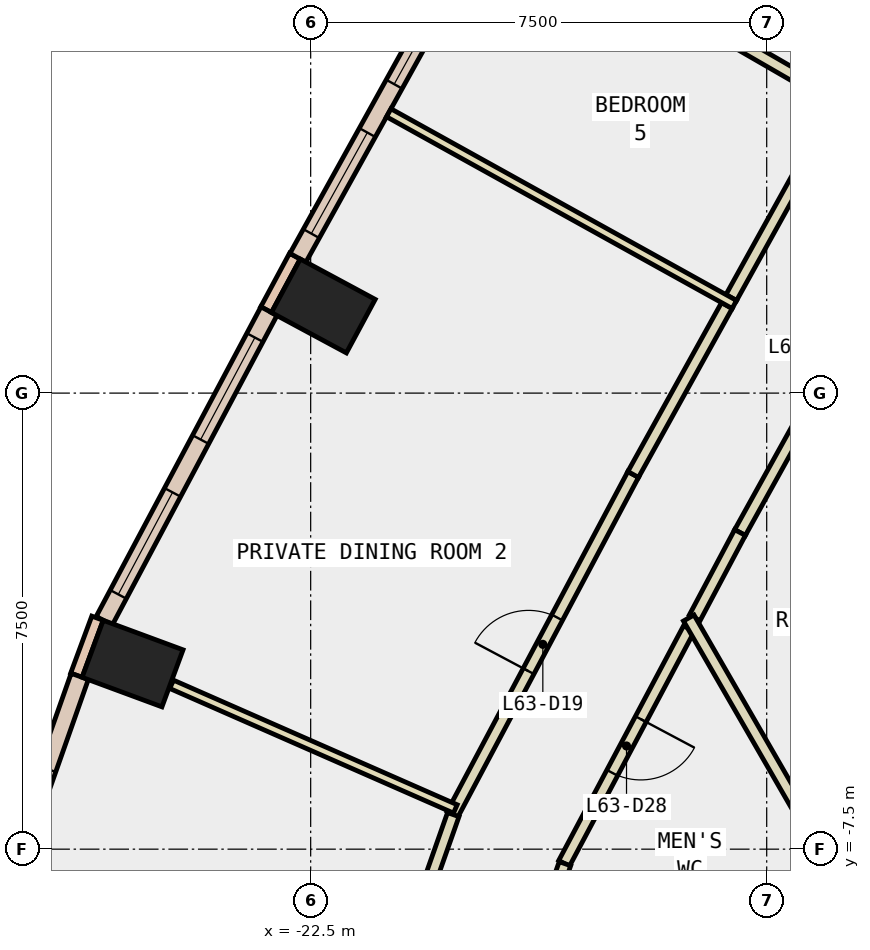
"""IFC4 building model, lengths in metres.
Left out: names, types, materials, properties, quantities, classifications, styles, units other than length and angle.
Written with IfcOpenShell. Run it as: python <this file> out.ifc"""

import sys

from ifc_helpers import new_model, si_unit, direction, frame, frame_2d, origin, origin_2d, place, context, subcontext, project, spatial, rectangle, extrude, element, fill, save


model = new_model("IFC4")
c1 = context("Model", 3, precision=1e-05, world=origin(), true_north=direction((0.0, 1.0)))
c2 = subcontext(c1, "Body", "Model", "MODEL_VIEW")
j1 = project(units=[si_unit("LENGTHUNIT", "METRE"), si_unit("PLANEANGLEUNIT", "RADIAN")], contexts=[c1])
p1 = place(None, origin())
s1 = spatial("IfcSite", under=j1, at=p1, CompositionType="ELEMENT")
p2 = place(p1, origin())
s2 = spatial("IfcBuilding", under=s1, at=p2, CompositionType="ELEMENT")
p3 = place(p2, frame((0.0, 0.0, 273.8)))
s3 = spatial("IfcBuildingStorey", under=s2, at=p3, CompositionType="ELEMENT", Elevation=273.8)
for number, where, z_axis, x_axis in (
    (1, (-22.292, 1.433, -0.34), (0.0, 0.0, 1.0), (0.474, 0.881, 0.0)),
    (2, (-25.429, -4.448, -0.34), (0.0, 0.0, 1.0), (0.347, 0.938, 0.0)),
):
    element("IfcColumn", number, at=place(p3, frame(where, z_axis=z_axis, x_axis=x_axis)), inside=s3, PredefinedType="COLUMN", context=c2, shape_type="SweptSolid", body=[
        extrude(rectangle(XDim=1.0, YDim=1.4, at=origin_2d()), origin(), (0.0, 0.0, 1.0), 3.6),
    ])
p4 = place(p3, frame((-7.578, -4.375, -0.34), z_axis=(0.0, 0.0, 1.0), x_axis=(-0.866024315419, -0.5000018851, 0.0)))
e3 = element("IfcWall", 3, at=p4, inside=s3, PredefinedType="SHEAR", context=c2, shape_type="SweptSolid", body=[
    extrude(rectangle(XDim=9.0, YDim=0.8, at=frame_2d((4.5, 0.0))), origin(), (0.0, 0.0, 1.0), 3.6),
])
p5 = place(p3, frame((-22.759, 2.253, 0.0), z_axis=(0.0, 0.0, 1.0), x_axis=(-0.473765014438, -0.880651299377, 0.0)))
e4 = element("IfcWall", 4, at=p5, inside=s3, PredefinedType="STANDARD", context=c2, shape_type="SweptSolid", body=[
    extrude(rectangle(XDim=1.0, YDim=0.2, at=frame_2d((0.5, 0.0))), origin(), (0.0, 0.0, 1.0), 3.26),
])
p6 = place(p3, frame((-26.006, -3.702, 0.0), z_axis=(0.0, 0.0, 1.0), x_axis=(-0.346892928577, -0.937904737222, 0.0)))
e5 = element("IfcWall", 5, at=p6, inside=s3, PredefinedType="STANDARD", context=c2, shape_type="SweptSolid", body=[
    extrude(rectangle(XDim=1.0, YDim=0.2, at=frame_2d((0.5, 0.0))), origin(), (0.0, 0.0, 1.0), 3.26),
])
p7 = place(p3, frame((-19.984, 7.14, 0.0), z_axis=(0.0, 0.0, 1.0), x_axis=(-0.485049005017, -0.874486971162, 0.0)))
e6 = element("IfcWall", 6, at=p7, inside=s3, PredefinedType="STANDARD", context=c2, shape_type="SweptSolid", body=[
    extrude(rectangle(XDim=5.62, YDim=0.3, at=frame_2d((2.81, 0.0))), origin(), (0.0, 0.0, 1.0), 3.26),
])
p8 = place(p7, frame((0.455, 0.0, 0.9)))
e7 = element("IfcOpeningElement", 7, at=p8, cuts=e6, PredefinedType="OPENING", context=c2, shape_type="SweptSolid", body=[
    extrude(rectangle(XDim=1.9, YDim=2.0, at=frame_2d((0.95, 1.0))), frame((0.0, 0.16, 0.0), z_axis=(0.0, -1.0, 0.0), x_axis=(1.0, 0.0, 0.0)), (0.0, 0.0, 1.0), 0.32),
])
p9 = place(p7, frame((3.265, 0.0, 0.9)))
e8 = element("IfcOpeningElement", 8, at=p9, cuts=e6, PredefinedType="OPENING", context=c2, shape_type="SweptSolid", body=[
    extrude(rectangle(XDim=1.9, YDim=2.0, at=frame_2d((0.95, 1.0))), frame((0.0, 0.16, 0.0), z_axis=(0.0, -1.0, 0.0), x_axis=(1.0, 0.0, 0.0)), (0.0, 0.0, 1.0), 0.32),
])
p10 = place(p3, frame((-23.186, 1.348, 0.0), z_axis=(0.0, 0.0, 1.0), x_axis=(-0.469691596427, -0.882830563724, 0.0)))
e9 = element("IfcWall", 9, at=p10, inside=s3, PredefinedType="STANDARD", context=c2, shape_type="SweptSolid", body=[
    extrude(rectangle(XDim=5.768, YDim=0.3, at=frame_2d((2.884, 0.0))), origin(), (0.0, 0.0, 1.0), 3.26),
])
p11 = place(p10, frame((0.492, 0.0, 0.9)))
e10 = element("IfcOpeningElement", 10, at=p11, cuts=e9, PredefinedType="OPENING", context=c2, shape_type="SweptSolid", body=[
    extrude(rectangle(XDim=1.9, YDim=2.0, at=frame_2d((0.95, 1.0))), frame((0.0, 0.16, 0.0), z_axis=(0.0, -1.0, 0.0), x_axis=(1.0, 0.0, 0.0)), (0.0, 0.0, 1.0), 0.32),
])
p12 = place(p10, frame((3.376, 0.0, 0.9)))
e11 = element("IfcOpeningElement", 11, at=p12, cuts=e9, PredefinedType="OPENING", context=c2, shape_type="SweptSolid", body=[
    extrude(rectangle(XDim=1.9, YDim=2.0, at=frame_2d((0.95, 1.0))), frame((0.0, 0.16, 0.0), z_axis=(0.0, -1.0, 0.0), x_axis=(1.0, 0.0, 0.0)), (0.0, 0.0, 1.0), 0.32),
])
p13 = place(p3, frame((-26.298, -4.659, 0.0), z_axis=(0.0, 0.0, 1.0), x_axis=(-0.332491532378, -0.943106240514, 0.0)))
e12 = element("IfcWall", 12, at=p13, inside=s3, PredefinedType="STANDARD", context=c2, shape_type="SweptSolid", body=[
    extrude(rectangle(XDim=4.625, YDim=0.3, at=frame_2d((2.312, 0.0))), origin(), (0.0, 0.0, 1.0), 3.26),
])
p14 = place(p13, frame((1.613, 0.0, 0.9)))
e13 = element("IfcOpeningElement", 13, at=p14, cuts=e12, PredefinedType="OPENING", context=c2, shape_type="SweptSolid", body=[
    extrude(rectangle(XDim=1.4, YDim=2.0, at=frame_2d((0.7, 1.0))), frame((0.0, 0.16, 0.0), z_axis=(0.0, -1.0, 0.0), x_axis=(1.0, 0.0, 0.0)), (0.0, 0.0, 1.0), 0.32),
])
p15 = place(p3, frame((-13.174, 1.79, 0.0), z_axis=(0.0, 0.0, 1.0), x_axis=(-0.485079003918, -0.874470331091, 0.0)))
e14 = element("IfcWall", 14, at=p15, inside=s3, PredefinedType="PARTITIONING", context=c2, shape_type="SweptSolid", body=[
    extrude(rectangle(XDim=4.669, YDim=0.2, at=frame_2d((2.334, 0.0))), origin(), (0.0, 0.0, 1.0), 3.26),
])
p16 = place(p15, frame((1.834, 0.0, 0.0)))
e15 = element("IfcOpeningElement", 15, at=p16, cuts=e14, PredefinedType="OPENING", context=c2, shape_type="SweptSolid", body=[
    extrude(rectangle(XDim=1.0, YDim=2.1, at=frame_2d((0.5, 1.05))), frame((0.0, 0.11, 0.0), z_axis=(0.0, -1.0, 0.0), x_axis=(1.0, 0.0, 0.0)), (0.0, 0.0, 1.0), 0.22),
])
p17 = place(p3, frame((-15.439, -2.293, 0.0), z_axis=(0.0, 0.0, 1.0), x_axis=(-0.469248780065, -0.883066012486, 0.0)))
e16 = element("IfcWall", 16, at=p17, inside=s3, PredefinedType="PARTITIONING", context=c2, shape_type="SweptSolid", body=[
    extrude(rectangle(XDim=1.59, YDim=0.2, at=frame_2d((0.795, 0.0))), origin(), (0.0, 0.0, 1.0), 3.26),
])
p18 = place(p3, frame((-16.279, -3.873, 0.0), z_axis=(0.0, 0.0, 1.0), x_axis=(-0.469587967357, -0.882885689608, 0.0)))
e17 = element("IfcWall", 17, at=p18, inside=s3, PredefinedType="PARTITIONING", context=c2, shape_type="SweptSolid", body=[
    extrude(rectangle(XDim=4.372, YDim=0.2, at=frame_2d((2.186, 0.0))), origin(), (0.0, 0.0, 1.0), 3.26),
])
p19 = place(p18, frame((1.686, 0.0, 0.0)))
e18 = element("IfcOpeningElement", 18, at=p19, cuts=e17, PredefinedType="OPENING", context=c2, shape_type="SweptSolid", body=[
    extrude(rectangle(XDim=1.0, YDim=2.1, at=frame_2d((0.5, 1.05))), frame((0.0, 0.11, 0.0), z_axis=(0.0, -1.0, 0.0), x_axis=(1.0, 0.0, 0.0)), (0.0, 0.0, 1.0), 0.22),
])
p20 = place(p3, frame((-18.318, -7.739, 0.0), z_axis=(0.0, 0.0, 1.0), x_axis=(-0.332486504777, -0.943108012977, 0.0)))
e19 = element("IfcWall", 19, at=p20, inside=s3, PredefinedType="PARTITIONING", context=c2, shape_type="SweptSolid", body=[
    extrude(rectangle(XDim=2.565, YDim=0.2, at=frame_2d((1.282, 0.0))), origin(), (0.0, 0.0, 1.0), 3.26),
])
p21 = place(p3, frame((-15.583, 1.571, 0.0), z_axis=(0.0, 0.0, 1.0), x_axis=(0.484944791944, 0.874544766588, 0.0)))
e20 = element("IfcWall", 20, at=p21, inside=s3, PredefinedType="PARTITIONING", context=c2, shape_type="SweptSolid", body=[
    extrude(rectangle(XDim=3.178, YDim=0.2, at=frame_2d((1.589, 0.0))), origin(), (0.0, 0.0, 1.0), 3.26),
])
p22 = place(p3, frame((-20.168, -6.926, 0.0), z_axis=(0.0, 0.0, 1.0), x_axis=(0.469552838911, 0.882904372778, 0.0)))
e21 = element("IfcWall", 21, at=p22, inside=s3, PredefinedType="PARTITIONING", context=c2, shape_type="SweptSolid", body=[
    extrude(rectangle(XDim=6.329, YDim=0.2, at=frame_2d((3.165, 0.0))), origin(), (0.0, 0.0, 1.0), 3.26),
])
p23 = place(p22, frame((2.665, 0.0, 0.0)))
e22 = element("IfcOpeningElement", 22, at=p23, cuts=e21, PredefinedType="OPENING", context=c2, shape_type="SweptSolid", body=[
    extrude(rectangle(XDim=1.0, YDim=2.1, at=frame_2d((0.5, 1.05))), frame((0.0, 0.11, 0.0), z_axis=(0.0, -1.0, 0.0), x_axis=(1.0, 0.0, 0.0)), (0.0, 0.0, 1.0), 0.22),
])
p24 = place(p3, frame((-17.196, -1.338, 0.0), z_axis=(0.0, 0.0, 1.0), x_axis=(0.485107756493, 0.87445438108, 0.0)))
e23 = element("IfcWall", 23, at=p24, inside=s3, PredefinedType="PARTITIONING", context=c2, shape_type="SweptSolid", body=[
    extrude(rectangle(XDim=3.177, YDim=0.2, at=frame_2d((1.588, 0.0))), origin(), (0.0, 0.0, 1.0), 3.26),
])
p25 = place(p3, frame((-21.248, -10.035, 0.0), z_axis=(0.0, 0.0, 1.0), x_axis=(0.332233916116, 0.943197023417, 0.0)))
e24 = element("IfcWall", 24, at=p25, inside=s3, PredefinedType="PARTITIONING", context=c2, shape_type="SweptSolid", body=[
    extrude(rectangle(XDim=3.29, YDim=0.2, at=frame_2d((1.645, 0.0))), origin(), (0.0, 0.0, 1.0), 3.26),
])
p26 = place(p3, frame((-14.079, -7.514, 0.0), z_axis=(0.0, 0.0, 1.0), x_axis=(-0.499959077901, 0.86604902888, 0.0)))
e25 = element("IfcWall", 25, at=p26, inside=s3, PredefinedType="PARTITIONING", context=c2, shape_type="SweptSolid", body=[
    extrude(rectangle(XDim=4.406, YDim=0.2, at=frame_2d((2.203, 0.0))), origin(), (0.0, 0.0, 1.0), 3.26),
])
p27 = place(p3, frame((-15.953, 6.039, 0.0), z_axis=(0.0, 0.0, 1.0), x_axis=(0.865998541277, -0.500046524342, 0.0)))
e26 = element("IfcWall", 26, at=p27, inside=s3, PredefinedType="PARTITIONING", context=c2, shape_type="SweptSolid", body=[
    extrude(rectangle(XDim=2.5, YDim=0.2, at=frame_2d((1.25, 0.0))), origin(), (0.0, 0.0, 1.0), 3.26),
])
p28 = place(p3, frame((-15.532, 1.457, 0.0), z_axis=(0.0, 0.0, 1.0), x_axis=(-0.874467143452, 0.485084750351, 0.0)))
e27 = element("IfcWall", 27, at=p28, inside=s3, PredefinedType="PARTITIONING", context=c2, shape_type="SweptSolid", body=[
    extrude(rectangle(XDim=6.5, YDim=0.15, at=frame_2d((3.25, 0.0))), origin(), (0.0, 0.0, 1.0), 3.26),
])
p29 = place(p3, frame((-20.121, -6.838, 0.0), z_axis=(0.0, 0.0, 1.0), x_axis=(-0.91561994307, 0.402044922679, 0.0)))
e28 = element("IfcWall", 28, at=p29, inside=s3, PredefinedType="PARTITIONING", context=c2, shape_type="SweptSolid", body=[
    extrude(rectangle(XDim=5.096, YDim=0.15, at=frame_2d((2.548, 0.0))), origin(), (0.0, 0.0, 1.0), 3.26),
])
p30 = place(p8, origin())
e29 = element("IfcWindow", 29, at=p30, inside=s3, PartitioningType="SINGLE_PANEL", PredefinedType="WINDOW", context=c2, shape_type="SweptSolid", body=[
    extrude(rectangle(XDim=1.9, YDim=2.0, at=frame_2d((0.95, 1.0))), frame((0.0, 0.03, 0.0), z_axis=(0.0, -1.0, 0.0), x_axis=(1.0, 0.0, 0.0)), (0.0, 0.0, 1.0), 0.06),
])
fill(e7, e29)
p31 = place(p9, origin())
e30 = element("IfcWindow", 30, at=p31, inside=s3, PartitioningType="SINGLE_PANEL", PredefinedType="WINDOW", context=c2, shape_type="SweptSolid", body=[
    extrude(rectangle(XDim=1.9, YDim=2.0, at=frame_2d((0.95, 1.0))), frame((0.0, 0.03, 0.0), z_axis=(0.0, -1.0, 0.0), x_axis=(1.0, 0.0, 0.0)), (0.0, 0.0, 1.0), 0.06),
])
fill(e8, e30)
p32 = place(p11, origin())
e31 = element("IfcWindow", 31, at=p32, inside=s3, PartitioningType="SINGLE_PANEL", PredefinedType="WINDOW", context=c2, shape_type="SweptSolid", body=[
    extrude(rectangle(XDim=1.9, YDim=2.0, at=frame_2d((0.95, 1.0))), frame((0.0, 0.03, 0.0), z_axis=(0.0, -1.0, 0.0), x_axis=(1.0, 0.0, 0.0)), (0.0, 0.0, 1.0), 0.06),
])
fill(e10, e31)
p33 = place(p12, origin())
e32 = element("IfcWindow", 32, at=p33, inside=s3, PartitioningType="SINGLE_PANEL", PredefinedType="WINDOW", context=c2, shape_type="SweptSolid", body=[
    extrude(rectangle(XDim=1.9, YDim=2.0, at=frame_2d((0.95, 1.0))), frame((0.0, 0.03, 0.0), z_axis=(0.0, -1.0, 0.0), x_axis=(1.0, 0.0, 0.0)), (0.0, 0.0, 1.0), 0.06),
])
fill(e11, e32)
p34 = place(p23, origin())
e33 = element("IfcDoor", 33, at=p34, inside=s3, OperationType="SINGLE_SWING_LEFT", PredefinedType="DOOR", context=c2, shape_type="SweptSolid", body=[
    extrude(rectangle(XDim=1.0, YDim=2.1, at=frame_2d((0.5, 1.05))), frame((0.0, 0.025, 0.0), z_axis=(0.0, -1.0, 0.0), x_axis=(1.0, 0.0, 0.0)), (0.0, 0.0, 1.0), 0.05),
])
fill(e22, e33)
p35 = place(p19, origin())
e34 = element("IfcDoor", 34, at=p35, inside=s3, OperationType="SINGLE_SWING_LEFT", PredefinedType="DOOR", context=c2, shape_type="SweptSolid", body=[
    extrude(rectangle(XDim=1.0, YDim=2.1, at=frame_2d((0.5, 1.05))), frame((0.0, 0.025, 0.0), z_axis=(0.0, -1.0, 0.0), x_axis=(1.0, 0.0, 0.0)), (0.0, 0.0, 1.0), 0.05),
])
fill(e18, e34)
save(model, sys.argv[1])
